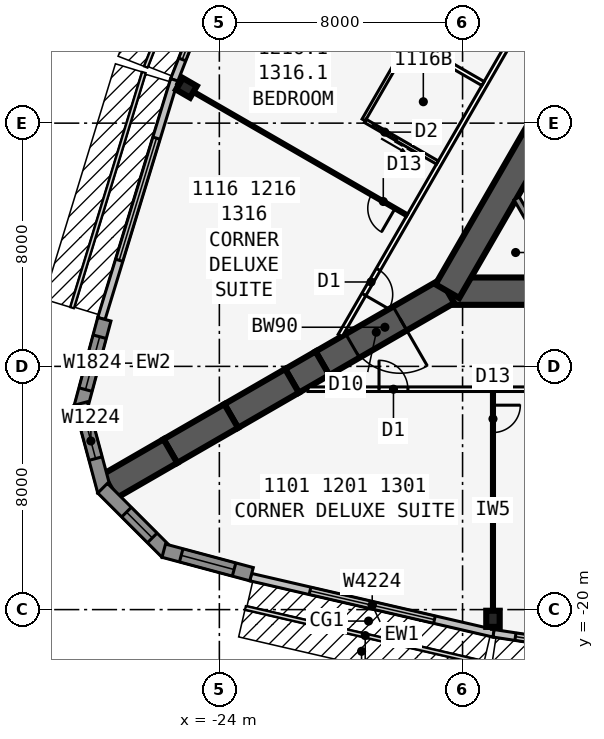
"""IFC4 building model, lengths in metres.
Left out: names, types, materials, properties, quantities, classifications, styles, units other than length and angle.
Written with IfcOpenShell. Run it as: python <this file> out.ifc"""

import sys

from ifc_helpers import new_model, si_unit, direction, frame, frame_2d, origin, origin_2d, place, context, subcontext, project, spatial, polyline, rectangle, i_section, outline, extrude, element, fill, save


model = new_model("IFC4")
c1 = context("Model", 3, precision=1e-05, world=origin(), true_north=direction((0.0, 1.0)))
c2 = subcontext(c1, "Body", "Model", "MODEL_VIEW")
j1 = project(units=[si_unit("LENGTHUNIT", "METRE"), si_unit("PLANEANGLEUNIT", "RADIAN")], contexts=[c1])
p1 = place(None, origin())
s1 = spatial("IfcSite", under=j1, at=p1, CompositionType="ELEMENT")
p2 = place(p1, origin())
s2 = spatial("IfcBuilding", under=s1, at=p2, CompositionType="ELEMENT")
p3 = place(p2, frame((0.0, 0.0, 48.9)))
s3 = spatial("IfcBuildingStorey", under=s2, at=p3, CompositionType="ELEMENT", Elevation=48.9)
p4 = place(p3, frame((-16.5, -9.526, 0.0), z_axis=(0.0, 0.0, 1.0), x_axis=(1.0, 0.0, 0.0)))
e1 = element("IfcWall", 1, at=p4, inside=s3, PredefinedType="SHEAR", context=c2, shape_type="SweptSolid", body=[
    extrude(rectangle(XDim=33.0, YDim=0.9, at=frame_2d((16.5, 0.0))), origin(), (0.0, 0.0, 1.0), 3.4),
])
p5 = place(p4, frame((14.05, 0.0, 0.0)))
e2 = element("IfcOpeningElement", 2, at=p5, cuts=e1, PredefinedType="OPENING", context=c2, shape_type="SweptSolid", body=[
    extrude(rectangle(XDim=1.8, YDim=2.13, at=frame_2d((0.9, 1.065))), frame((0.0, 0.46, 0.0), z_axis=(0.0, -1.0, 0.0), x_axis=(1.0, 0.0, 0.0)), (0.0, 0.0, 1.0), 0.92),
])
p6 = place(p3, frame((0.0, 19.052, 0.0), z_axis=(0.0, 0.0, 1.0), x_axis=(-0.499999749417, -0.866025548458, 0.0)))
e3 = element("IfcWall", 3, at=p6, inside=s3, PredefinedType="SHEAR", context=c2, shape_type="SweptSolid", body=[
    extrude(rectangle(XDim=33.0, YDim=0.9, at=frame_2d((16.5, 0.0))), origin(), (0.0, 0.0, 1.0), 3.4),
])
p7 = place(p6, frame((14.15, 0.0, 0.0)))
e4 = element("IfcOpeningElement", 4, at=p7, cuts=e3, PredefinedType="OPENING", context=c2, shape_type="SweptSolid", body=[
    extrude(rectangle(XDim=1.8, YDim=2.13, at=frame_2d((0.9, 1.065))), frame((0.0, 0.46, 0.0), z_axis=(0.0, -1.0, 0.0), x_axis=(1.0, 0.0, 0.0)), (0.0, 0.0, 1.0), 0.92),
])
p8 = place(p6, frame((12.6, 0.0, 0.0)))
e5 = element("IfcOpeningElement", 5, at=p8, cuts=e3, PredefinedType="OPENING", context=c2, shape_type="SweptSolid", body=[
    extrude(rectangle(XDim=1.0, YDim=2.13, at=frame_2d((0.5, 1.065))), frame((0.0, 0.46, 0.0), z_axis=(0.0, -1.0, 0.0), x_axis=(1.0, 0.0, 0.0)), (0.0, 0.0, 1.0), 0.92),
])
p9 = place(p3, frame((-16.5, -9.526, 0.0), z_axis=(0.0, 0.0, 1.0), x_axis=(-0.866031398331, -0.499989616998, 0.0)))
e6 = element("IfcWall", 6, at=p9, inside=s3, PredefinedType="SHEAR", context=c2, shape_type="SweptSolid", body=[
    extrude(rectangle(XDim=4.746, YDim=0.9, at=frame_2d((2.373, 0.0))), origin(), (0.0, 0.0, 1.0), 3.4),
])
p10 = place(p9, frame((1.8, 0.0, 0.0)))
e7 = element("IfcOpeningElement", 7, at=p10, cuts=e6, PredefinedType="OPENING", context=c2, shape_type="SweptSolid", body=[
    extrude(rectangle(XDim=1.8, YDim=2.13, at=frame_2d((0.9, 1.065))), frame((0.0, 0.46, 0.0), z_axis=(0.0, -1.0, 0.0), x_axis=(1.0, 0.0, 0.0)), (0.0, 0.0, 1.0), 0.92),
])
p11 = place(p3, frame((-20.61, -11.899, 0.0), z_axis=(0.0, 0.0, 1.0), x_axis=(-0.866009537788, -0.500027479704, 0.0)))
e8 = element("IfcWall", 8, at=p11, inside=s3, PredefinedType="SHEAR", context=c2, shape_type="SweptSolid", body=[
    extrude(rectangle(XDim=1.155, YDim=0.9, at=frame_2d((0.577, 0.0))), origin(), (0.0, 0.0, 1.0), 3.4),
])
for number, where, z_axis, x_axis in (
    (9, (-21.61, -12.477, 0.0), (0.0, 0.0, 1.0), (-0.866, -0.5, 0.0)),
    (10, (-23.61, -13.631, 0.0), (0.0, 0.0, 1.0), (-0.866, -0.5, 0.0)),
    (11, (-25.61, -14.786, 0.0), (0.0, 0.0, 1.0), (-0.866, -0.5, 0.0)),
):
    element("IfcWall", number, at=place(p3, frame(where, z_axis=z_axis, x_axis=x_axis)), inside=s3, PredefinedType="SHEAR", context=c2, shape_type="SweptSolid", body=[
        extrude(rectangle(XDim=2.309, YDim=0.9, at=frame_2d((1.155, 0.0))), origin(), (0.0, 0.0, 1.0), 3.4),
    ])
for number, where, z_axis, x_axis in (
    (12, (-15.0, -20.303, 0.0), (0.0, 0.0, 1.0), (1.0, 0.0, 0.0)),
    (13, (-25.083, -2.839, 0.0), (0.0, 0.0, 1.0), (-0.5, -0.866, 0.0)),
):
    element("IfcColumn", number, at=place(p3, frame(where, z_axis=z_axis, x_axis=x_axis)), inside=s3, PredefinedType="COLUMN", context=c2, shape_type="SweptSolid", body=[
        extrude(i_section(OverallWidth=0.442, OverallDepth=0.531, WebThickness=0.066, FlangeThickness=0.106, at=origin_2d()), origin(), (0.0, 0.0, 1.0), 3.4),
    ])
p12 = place(p3, frame((-22.972, -18.931, 0.0), z_axis=(0.0, 0.0, 1.0), x_axis=(0.974279327392, -0.225343720163, 0.0)))
e14 = element("IfcWall", 14, at=p12, inside=s3, PredefinedType="STANDARD", context=c2, shape_type="SweptSolid", body=[
    extrude(rectangle(XDim=8.211, YDim=0.25, at=frame_2d((4.105, 0.0))), origin(), (0.0, 0.0, 1.0), 3.235),
])
p13 = place(p12, frame((2.006, 0.0, 0.45)))
e15 = element("IfcOpeningElement", 15, at=p13, cuts=e14, PredefinedType="OPENING", context=c2, shape_type="SweptSolid", body=[
    extrude(rectangle(XDim=4.2, YDim=2.4, at=frame_2d((2.1, 1.2))), frame((0.0, 0.135, 0.0), z_axis=(0.0, -1.0, 0.0), x_axis=(1.0, 0.0, 0.0)), (0.0, 0.0, 1.0), 0.27),
])
p14 = place(p3, frame((-14.981, -20.779, 0.0), z_axis=(0.0, 0.0, 1.0), x_axis=(0.988615403399, -0.150464561152, 0.0)))
e16 = element("IfcWall", 16, at=p14, inside=s3, PredefinedType="STANDARD", context=c2, shape_type="SweptSolid", body=[
    extrude(rectangle(XDim=5.058, YDim=0.25, at=frame_2d((2.529, 0.0))), origin(), (0.0, 0.0, 1.0), 3.235),
])
p15 = place(p14, frame((0.729, 0.0, 0.45)))
e17 = element("IfcOpeningElement", 17, at=p15, cuts=e16, PredefinedType="OPENING", context=c2, shape_type="SweptSolid", body=[
    extrude(rectangle(XDim=3.6, YDim=2.4, at=frame_2d((1.8, 1.2))), frame((0.0, 0.135, 0.0), z_axis=(0.0, -1.0, 0.0), x_axis=(1.0, 0.0, 0.0)), (0.0, 0.0, 1.0), 0.27),
])
p16 = place(p3, frame((-23.645, 2.126, 0.0), z_axis=(0.0, 0.0, 1.0), x_axis=(-0.364013463868, -0.931393685894, 0.0)))
e18 = element("IfcWall", 18, at=p16, inside=s3, PredefinedType="STANDARD", context=c2, shape_type="SweptSolid", body=[
    extrude(rectangle(XDim=5.058, YDim=0.25, at=frame_2d((2.529, 0.0))), origin(), (0.0, 0.0, 1.0), 3.235),
])
p17 = place(p16, frame((0.729, 0.0, 0.45)))
e19 = element("IfcOpeningElement", 19, at=p17, cuts=e18, PredefinedType="OPENING", context=c2, shape_type="SweptSolid", body=[
    extrude(rectangle(XDim=3.6, YDim=2.4, at=frame_2d((1.8, 1.2))), frame((0.0, 0.135, 0.0), z_axis=(0.0, -1.0, 0.0), x_axis=(1.0, 0.0, 0.0)), (0.0, 0.0, 1.0), 0.27),
])
p18 = place(p3, frame((-25.483, -2.575, 0.0), z_axis=(0.0, 0.0, 1.0), x_axis=(-0.2919790669, -0.956424709265, 0.0)))
e20 = element("IfcWall", 20, at=p18, inside=s3, PredefinedType="STANDARD", context=c2, shape_type="SweptSolid", body=[
    extrude(rectangle(XDim=8.211, YDim=0.25, at=frame_2d((4.105, 0.0))), origin(), (0.0, 0.0, 1.0), 3.235),
])
p19 = place(p18, frame((2.006, 0.0, 0.45)))
e21 = element("IfcOpeningElement", 21, at=p19, cuts=e20, PredefinedType="OPENING", context=c2, shape_type="SweptSolid", body=[
    extrude(rectangle(XDim=4.2, YDim=2.4, at=frame_2d((2.1, 1.2))), frame((0.0, 0.135, 0.0), z_axis=(0.0, -1.0, 0.0), x_axis=(1.0, 0.0, 0.0)), (0.0, 0.0, 1.0), 0.27),
])
p20 = place(p3, frame((-27.783, -10.45, 0.0), z_axis=(0.0, 0.0, 1.0), x_axis=(-0.258780998834, -0.965936019953, 0.0)))
e22 = element("IfcWall", 22, at=p20, inside=s3, PredefinedType="SOLIDWALL", context=c2, shape_type="SweptSolid", body=[
    extrude(rectangle(XDim=2.989, YDim=0.45, at=frame_2d((1.494, 0.0))), origin(), (0.0, 0.0, 1.0), 3.235),
])
p21 = place(p20, frame((0.594, 0.0, 0.45)))
e23 = element("IfcOpeningElement", 23, at=p21, cuts=e22, PredefinedType="OPENING", context=c2, shape_type="SweptSolid", body=[
    extrude(rectangle(XDim=1.8, YDim=2.4, at=frame_2d((0.9, 1.2))), frame((0.0, 0.235, 0.0), z_axis=(0.0, -1.0, 0.0), x_axis=(1.0, 0.0, 0.0)), (0.0, 0.0, 1.0), 0.47),
])
p22 = place(p3, frame((-28.556, -13.221, 0.0), z_axis=(0.0, 0.0, 1.0), x_axis=(0.258801419081, -0.965930548995, 0.0)))
e24 = element("IfcWall", 24, at=p22, inside=s3, PredefinedType="SOLIDWALL", context=c2, shape_type="SweptSolid", body=[
    extrude(outline(polyline([(2.989, 0.225), (2.929, 0.225), (2.437, 0.093), (2.402, 0.225), (0.0, 0.225), (0.0, -0.225), (2.989, -0.225), (2.989, 0.225)])), origin(), (0.0, 0.0, 1.0), 3.235),
])
p23 = place(p22, frame((0.676, 0.0, 0.45)))
e25 = element("IfcOpeningElement", 25, at=p23, cuts=e24, PredefinedType="OPENING", context=c2, shape_type="SweptSolid", body=[
    extrude(rectangle(XDim=1.2, YDim=2.4, at=frame_2d((0.6, 1.2))), frame((0.0, 0.235, 0.0), z_axis=(0.0, -1.0, 0.0), x_axis=(1.0, 0.0, 0.0)), (0.0, 0.0, 1.0), 0.47),
])
p24 = place(p3, frame((-27.841, -16.007, 0.0), z_axis=(0.0, 0.0, 1.0), x_axis=(0.707025086683, -0.707188466253, 0.0)))
e26 = element("IfcWall", 26, at=p24, inside=s3, PredefinedType="SOLIDWALL", context=c2, shape_type="SweptSolid", body=[
    extrude(outline(polyline([(2.989, 0.225), (0.586, 0.225), (0.551, 0.093), (0.059, 0.225), (0.0, 0.225), (0.0, -0.225), (2.989, -0.225), (2.989, 0.225)])), origin(), (0.0, 0.0, 1.0), 3.235),
])
p25 = place(p24, frame((1.113, 0.0, 0.45)))
e27 = element("IfcOpeningElement", 27, at=p25, cuts=e26, PredefinedType="OPENING", context=c2, shape_type="SweptSolid", body=[
    extrude(rectangle(XDim=1.2, YDim=2.4, at=frame_2d((0.6, 1.2))), frame((0.0, 0.235, 0.0), z_axis=(0.0, -1.0, 0.0), x_axis=(1.0, 0.0, 0.0)), (0.0, 0.0, 1.0), 0.47),
])
p26 = place(p3, frame((-25.829, -18.062, 0.0), z_axis=(0.0, 0.0, 1.0), x_axis=(0.965930548995, -0.258801419081, 0.0)))
e28 = element("IfcWall", 28, at=p26, inside=s3, PredefinedType="SOLIDWALL", context=c2, shape_type="SweptSolid", body=[
    extrude(rectangle(XDim=2.989, YDim=0.45, at=frame_2d((1.494, 0.0))), origin(), (0.0, 0.0, 1.0), 3.235),
])
p27 = place(p26, frame((0.594, 0.0, 0.45)))
e29 = element("IfcOpeningElement", 29, at=p27, cuts=e28, PredefinedType="OPENING", context=c2, shape_type="SweptSolid", body=[
    extrude(rectangle(XDim=1.8, YDim=2.4, at=frame_2d((0.9, 1.2))), frame((0.0, 0.235, 0.0), z_axis=(0.0, -1.0, 0.0), x_axis=(1.0, 0.0, 0.0)), (0.0, 0.0, 1.0), 0.47),
])
p28 = place(p3, frame((-21.086, -12.751, 0.0), z_axis=(0.0, 0.0, 1.0), x_axis=(1.0, 0.0, 0.0)))
e30 = element("IfcWall", 30, at=p28, inside=s3, PredefinedType="PARTITIONING", context=c2, shape_type="SweptSolid", body=[
    extrude(rectangle(XDim=42.172, YDim=0.15, at=frame_2d((21.086, 0.0))), origin(), (0.0, 0.0, 1.0), 3.235),
])
p29 = place(p28, frame((2.338, 0.0, 0.0)))
e31 = element("IfcOpeningElement", 31, at=p29, cuts=e30, PredefinedType="OPENING", context=c2, shape_type="SweptSolid", body=[
    extrude(rectangle(XDim=0.95, YDim=2.13, at=frame_2d((0.475, 1.065))), frame((0.0, 0.085, 0.0), z_axis=(0.0, -1.0, 0.0), x_axis=(1.0, 0.0, 0.0)), (0.0, 0.0, 1.0), 0.17),
])
p30 = place(p28, frame((14.311, 0.0, 0.0)))
e32 = element("IfcOpeningElement", 32, at=p30, cuts=e30, PredefinedType="OPENING", context=c2, shape_type="SweptSolid", body=[
    extrude(rectangle(XDim=0.95, YDim=2.13, at=frame_2d((0.475, 1.065))), frame((0.0, 0.085, 0.0), z_axis=(0.0, -1.0, 0.0), x_axis=(1.0, 0.0, 0.0)), (0.0, 0.0, 1.0), 0.17),
])
p31 = place(p28, frame((23.086, 0.0, 0.0)))
e33 = element("IfcOpeningElement", 33, at=p31, cuts=e30, PredefinedType="OPENING", context=c2, shape_type="SweptSolid", body=[
    extrude(rectangle(XDim=1.0, YDim=2.13, at=frame_2d((0.5, 1.065))), frame((0.0, 0.085, 0.0), z_axis=(0.0, -1.0, 0.0), x_axis=(1.0, 0.0, 0.0)), (0.0, 0.0, 1.0), 0.17),
])
p32 = place(p28, frame((29.311, 0.0, 0.0)))
e34 = element("IfcOpeningElement", 34, at=p32, cuts=e30, PredefinedType="OPENING", context=c2, shape_type="SweptSolid", body=[
    extrude(rectangle(XDim=0.95, YDim=2.13, at=frame_2d((0.475, 1.065))), frame((0.0, 0.085, 0.0), z_axis=(0.0, -1.0, 0.0), x_axis=(1.0, 0.0, 0.0)), (0.0, 0.0, 1.0), 0.17),
])
p33 = place(p28, frame((39.311, 0.0, 0.0)))
e35 = element("IfcOpeningElement", 35, at=p33, cuts=e30, PredefinedType="OPENING", context=c2, shape_type="SweptSolid", body=[
    extrude(rectangle(XDim=0.95, YDim=2.13, at=frame_2d((0.475, 1.065))), frame((0.0, 0.085, 0.0), z_axis=(0.0, -1.0, 0.0), x_axis=(1.0, 0.0, 0.0)), (0.0, 0.0, 1.0), 0.17),
])
p34 = place(p3, frame((-15.0, -12.826, 0.0), z_axis=(0.0, 0.0, 1.0), x_axis=(0.0, -1.0, 0.0)))
e36 = element("IfcWall", 36, at=p34, inside=s3, PredefinedType="PARTITIONING", context=c2, shape_type="SweptSolid", body=[
    extrude(rectangle(XDim=7.82, YDim=0.1, at=frame_2d((3.91, 0.0))), origin(), (0.0, 0.0, 1.0), 2.389),
])
p35 = place(p34, frame((0.45, 0.0, 0.0)))
e37 = element("IfcOpeningElement", 37, at=p35, cuts=e36, PredefinedType="OPENING", context=c2, shape_type="SweptSolid", body=[
    extrude(rectangle(XDim=0.9, YDim=2.13, at=frame_2d((0.45, 1.065))), frame((0.0, 0.06, 0.0), z_axis=(0.0, -1.0, 0.0), x_axis=(1.0, 0.0, 0.0)), (0.0, 0.0, 1.0), 0.12),
])
p36 = place(p3, frame((-0.5, 22.836, 0.0), z_axis=(0.0, 0.0, 1.0), x_axis=(-0.500001677587, -0.866024435227, 0.0)))
e38 = element("IfcWall", 38, at=p36, inside=s3, PredefinedType="PARTITIONING", context=c2, shape_type="SweptSolid", body=[
    extrude(rectangle(XDim=39.054, YDim=0.15, at=frame_2d((19.527, 0.0))), origin(), (0.0, 0.0, 1.0), 3.235),
])
p37 = place(p36, frame((1.558, 0.0, 0.0)))
e39 = element("IfcOpeningElement", 39, at=p37, cuts=e38, PredefinedType="OPENING", context=c2, shape_type="SweptSolid", body=[
    extrude(rectangle(XDim=0.95, YDim=2.13, at=frame_2d((0.475, 1.065))), frame((0.0, 0.085, 0.0), z_axis=(0.0, -1.0, 0.0), x_axis=(1.0, 0.0, 0.0)), (0.0, 0.0, 1.0), 0.17),
])
p38 = place(p36, frame((12.752, 0.0, 0.0)))
e40 = element("IfcOpeningElement", 40, at=p38, cuts=e38, PredefinedType="OPENING", context=c2, shape_type="SweptSolid", body=[
    extrude(rectangle(XDim=0.95, YDim=2.13, at=frame_2d((0.475, 1.065))), frame((0.0, 0.085, 0.0), z_axis=(0.0, -1.0, 0.0), x_axis=(1.0, 0.0, 0.0)), (0.0, 0.0, 1.0), 0.17),
])
p39 = place(p36, frame((17.152, 0.0, 0.0)))
e41 = element("IfcOpeningElement", 41, at=p39, cuts=e38, PredefinedType="OPENING", context=c2, shape_type="SweptSolid", body=[
    extrude(rectangle(XDim=0.95, YDim=2.13, at=frame_2d((0.475, 1.065))), frame((0.0, 0.085, 0.0), z_axis=(0.0, -1.0, 0.0), x_axis=(1.0, 0.0, 0.0)), (0.0, 0.0, 1.0), 0.17),
])
p40 = place(p36, frame((22.152, 0.0, 0.0)))
e42 = element("IfcOpeningElement", 42, at=p40, cuts=e38, PredefinedType="OPENING", context=c2, shape_type="SweptSolid", body=[
    extrude(rectangle(XDim=0.95, YDim=2.13, at=frame_2d((0.475, 1.065))), frame((0.0, 0.085, 0.0), z_axis=(0.0, -1.0, 0.0), x_axis=(1.0, 0.0, 0.0)), (0.0, 0.0, 1.0), 0.17),
])
p41 = place(p36, frame((27.152, 0.0, 0.0)))
e43 = element("IfcOpeningElement", 43, at=p41, cuts=e38, PredefinedType="OPENING", context=c2, shape_type="SweptSolid", body=[
    extrude(rectangle(XDim=0.95, YDim=2.13, at=frame_2d((0.475, 1.065))), frame((0.0, 0.085, 0.0), z_axis=(0.0, -1.0, 0.0), x_axis=(1.0, 0.0, 0.0)), (0.0, 0.0, 1.0), 0.17),
])
p42 = place(p36, frame((36.546, 0.0, 0.0)))
e44 = element("IfcOpeningElement", 44, at=p42, cuts=e38, PredefinedType="OPENING", context=c2, shape_type="SweptSolid", body=[
    extrude(rectangle(XDim=0.95, YDim=2.13, at=frame_2d((0.475, 1.065))), frame((0.0, 0.085, 0.0), z_axis=(0.0, -1.0, 0.0), x_axis=(1.0, 0.0, 0.0)), (0.0, 0.0, 1.0), 0.17),
])
p43 = place(p3, frame((-15.329, -2.697, 0.0), z_axis=(0.0, 0.0, 1.0), x_axis=(-0.866018409083, 0.500012114982, 0.0)))
e45 = element("IfcWall", 45, at=p43, inside=s3, PredefinedType="PARTITIONING", context=c2, shape_type="SweptSolid", body=[
    extrude(rectangle(XDim=9.485, YDim=0.15, at=frame_2d((4.742, 0.0))), origin(), (0.0, 0.0, 1.0), 2.389),
])
p44 = place(p3, frame((-17.829, -7.027, 0.0), z_axis=(0.0, 0.0, 1.0), x_axis=(-0.866032659912, 0.499987431809, 0.0)))
e46 = element("IfcWall", 46, at=p44, inside=s3, PredefinedType="PARTITIONING", context=c2, shape_type="SweptSolid", body=[
    extrude(rectangle(XDim=8.72, YDim=0.1, at=frame_2d((4.36, 0.0))), origin(), (0.0, 0.0, 1.0), 2.389),
])
p45 = place(p44, frame((0.45, 0.0, 0.0)))
e47 = element("IfcOpeningElement", 47, at=p45, cuts=e46, PredefinedType="OPENING", context=c2, shape_type="SweptSolid", body=[
    extrude(rectangle(XDim=0.9, YDim=2.13, at=frame_2d((0.45, 1.065))), frame((0.0, 0.06, 0.0), z_axis=(0.0, -1.0, 0.0), x_axis=(1.0, 0.0, 0.0)), (0.0, 0.0, 1.0), 0.12),
])
p46 = place(p3, frame((-17.753, -1.297, 0.0), z_axis=(0.0, 0.0, 1.0), x_axis=(-0.499990139034, -0.866031096941, 0.0)))
e48 = element("IfcWall", 48, at=p46, inside=s3, PredefinedType="PLUMBINGWALL", context=c2, shape_type="SweptSolid", body=[
    extrude(rectangle(XDim=3.0, YDim=0.12, at=frame_2d((1.5, 0.0))), origin(), (0.0, 0.0, 1.0), 3.235),
])
p47 = place(p3, frame((-16.829, -5.295, 0.0), z_axis=(0.0, 0.0, 1.0), x_axis=(-0.866035715982, 0.499982138324, 0.0)))
e49 = element("IfcWall", 49, at=p47, inside=s3, PredefinedType="PLUMBINGWALL", context=c2, shape_type="SweptSolid", body=[
    extrude(rectangle(XDim=2.74, YDim=0.12, at=frame_2d((1.37, 0.0))), origin(), (0.0, 0.0, 1.0), 3.235),
])
p48 = place(p47, frame((1.55, 0.0, 0.0)))
e50 = element("IfcOpeningElement", 50, at=p48, cuts=e49, PredefinedType="OPENING", context=c2, shape_type="SweptSolid", body=[
    extrude(rectangle(XDim=0.9, YDim=2.13, at=frame_2d((0.45, 1.065))), frame((0.0, 0.07, 0.0), z_axis=(0.0, -1.0, 0.0), x_axis=(1.0, 0.0, 0.0)), (0.0, 0.0, 1.0), 0.14),
])
p49 = place(p3, frame((-12.719, -9.076, 0.0), z_axis=(0.0, 0.0, 1.0), x_axis=(-0.499952404951, 0.866052881055, 0.0)))
e51 = element("IfcWall", 51, at=p49, inside=s3, PredefinedType="SOLIDWALL", context=c2, shape_type="SweptSolid", body=[
    extrude(rectangle(XDim=3.002, YDim=0.2, at=frame_2d((1.501, 0.0))), origin(), (0.0, 0.0, 1.0), 3.235),
])
p50 = place(p13, origin())
e52 = element("IfcWindow", 52, at=p50, inside=s3, PartitioningType="SINGLE_PANEL", PredefinedType="WINDOW", context=c2, shape_type="SweptSolid", body=[
    extrude(rectangle(XDim=4.2, YDim=2.4, at=frame_2d((2.1, 1.2))), frame((0.0, 0.03, 0.0), z_axis=(0.0, -1.0, 0.0), x_axis=(1.0, 0.0, 0.0)), (0.0, 0.0, 1.0), 0.06),
])
fill(e15, e52)
p51 = place(p15, origin())
e53 = element("IfcWindow", 53, at=p51, inside=s3, PartitioningType="SINGLE_PANEL", PredefinedType="WINDOW", context=c2, shape_type="SweptSolid", body=[
    extrude(rectangle(XDim=3.6, YDim=2.4, at=frame_2d((1.8, 1.2))), frame((0.0, 0.03, 0.0), z_axis=(0.0, -1.0, 0.0), x_axis=(1.0, 0.0, 0.0)), (0.0, 0.0, 1.0), 0.06),
])
fill(e17, e53)
p52 = place(p17, origin())
e54 = element("IfcWindow", 54, at=p52, inside=s3, PartitioningType="SINGLE_PANEL", PredefinedType="WINDOW", context=c2, shape_type="SweptSolid", body=[
    extrude(rectangle(XDim=3.6, YDim=2.4, at=frame_2d((1.8, 1.2))), frame((0.0, 0.03, 0.0), z_axis=(0.0, -1.0, 0.0), x_axis=(1.0, 0.0, 0.0)), (0.0, 0.0, 1.0), 0.06),
])
fill(e19, e54)
p53 = place(p19, origin())
e55 = element("IfcWindow", 55, at=p53, inside=s3, PartitioningType="SINGLE_PANEL", PredefinedType="WINDOW", context=c2, shape_type="SweptSolid", body=[
    extrude(rectangle(XDim=4.2, YDim=2.4, at=frame_2d((2.1, 1.2))), frame((0.0, 0.03, 0.0), z_axis=(0.0, -1.0, 0.0), x_axis=(1.0, 0.0, 0.0)), (0.0, 0.0, 1.0), 0.06),
])
fill(e21, e55)
p54 = place(p21, origin())
e56 = element("IfcWindow", 56, at=p54, inside=s3, PartitioningType="SINGLE_PANEL", PredefinedType="WINDOW", context=c2, shape_type="SweptSolid", body=[
    extrude(rectangle(XDim=1.8, YDim=2.4, at=frame_2d((0.9, 1.2))), frame((0.0, 0.03, 0.0), z_axis=(0.0, -1.0, 0.0), x_axis=(1.0, 0.0, 0.0)), (0.0, 0.0, 1.0), 0.06),
])
fill(e23, e56)
p55 = place(p23, origin())
e57 = element("IfcWindow", 57, at=p55, inside=s3, PartitioningType="SINGLE_PANEL", PredefinedType="WINDOW", context=c2, shape_type="SweptSolid", body=[
    extrude(rectangle(XDim=1.2, YDim=2.4, at=frame_2d((0.6, 1.2))), frame((0.0, 0.03, 0.0), z_axis=(0.0, -1.0, 0.0), x_axis=(1.0, 0.0, 0.0)), (0.0, 0.0, 1.0), 0.06),
])
fill(e25, e57)
p56 = place(p25, origin())
e58 = element("IfcWindow", 58, at=p56, inside=s3, PartitioningType="SINGLE_PANEL", PredefinedType="WINDOW", context=c2, shape_type="SweptSolid", body=[
    extrude(rectangle(XDim=1.2, YDim=2.4, at=frame_2d((0.6, 1.2))), frame((0.0, 0.03, 0.0), z_axis=(0.0, -1.0, 0.0), x_axis=(1.0, 0.0, 0.0)), (0.0, 0.0, 1.0), 0.06),
])
fill(e27, e58)
p57 = place(p27, origin())
e59 = element("IfcWindow", 59, at=p57, inside=s3, PartitioningType="SINGLE_PANEL", PredefinedType="WINDOW", context=c2, shape_type="SweptSolid", body=[
    extrude(rectangle(XDim=1.8, YDim=2.4, at=frame_2d((0.9, 1.2))), frame((0.0, 0.03, 0.0), z_axis=(0.0, -1.0, 0.0), x_axis=(1.0, 0.0, 0.0)), (0.0, 0.0, 1.0), 0.06),
])
fill(e29, e59)
p58 = place(p35, origin())
e60 = element("IfcDoor", 60, at=p58, inside=s3, OperationType="SINGLE_SWING_LEFT", PredefinedType="DOOR", context=c2, shape_type="SweptSolid", body=[
    extrude(rectangle(XDim=0.9, YDim=2.13, at=frame_2d((0.45, 1.065))), frame((0.0, 0.025, 0.0), z_axis=(0.0, -1.0, 0.0), x_axis=(1.0, 0.0, 0.0)), (0.0, 0.0, 1.0), 0.05),
])
fill(e37, e60)
p59 = place(p29, origin())
e61 = element("IfcDoor", 61, at=p59, inside=s3, OperationType="SINGLE_SWING_LEFT", PredefinedType="DOOR", context=c2, shape_type="SweptSolid", body=[
    extrude(rectangle(XDim=0.95, YDim=2.13, at=frame_2d((0.475, 1.065))), frame((0.0, 0.025, 0.0), z_axis=(0.0, -1.0, 0.0), x_axis=(1.0, 0.0, 0.0)), (0.0, 0.0, 1.0), 0.05),
])
fill(e31, e61)
p60 = place(p45, origin())
e62 = element("IfcDoor", 62, at=p60, inside=s3, OperationType="SINGLE_SWING_LEFT", PredefinedType="DOOR", context=c2, shape_type="SweptSolid", body=[
    extrude(rectangle(XDim=0.9, YDim=2.13, at=frame_2d((0.45, 1.065))), frame((0.0, 0.025, 0.0), z_axis=(0.0, -1.0, 0.0), x_axis=(1.0, 0.0, 0.0)), (0.0, 0.0, 1.0), 0.05),
])
fill(e47, e62)
p61 = place(p48, origin())
e63 = element("IfcDoor", 63, at=p61, inside=s3, OperationType="SLIDING_TO_LEFT", PredefinedType="DOOR", context=c2, shape_type="SweptSolid", body=[
    extrude(rectangle(XDim=0.9, YDim=2.13, at=frame_2d((0.45, 1.065))), frame((0.0, 0.025, 0.0), z_axis=(0.0, -1.0, 0.0), x_axis=(1.0, 0.0, 0.0)), (0.0, 0.0, 1.0), 0.05),
])
fill(e50, e63)
p62 = place(p42, origin())
e64 = element("IfcDoor", 64, at=p62, inside=s3, OperationType="SINGLE_SWING_RIGHT", PredefinedType="DOOR", context=c2, shape_type="SweptSolid", body=[
    extrude(rectangle(XDim=0.95, YDim=2.13, at=frame_2d((0.475, 1.065))), frame((0.0, 0.025, 0.0), z_axis=(0.0, -1.0, 0.0), x_axis=(1.0, 0.0, 0.0)), (0.0, 0.0, 1.0), 0.05),
])
fill(e44, e64)
p63 = place(p10, origin())
e65 = element("IfcDoor", 65, at=p63, inside=s3, OperationType="DOUBLE_DOOR_DOUBLE_SWING", PredefinedType="DOOR", context=c2, shape_type="SweptSolid", body=[
    extrude(rectangle(XDim=1.8, YDim=2.13, at=frame_2d((0.9, 1.065))), frame((0.0, 0.025, 0.0), z_axis=(0.0, -1.0, 0.0), x_axis=(1.0, 0.0, 0.0)), (0.0, 0.0, 1.0), 0.05),
])
fill(e7, e65)
save(model, sys.argv[1])
